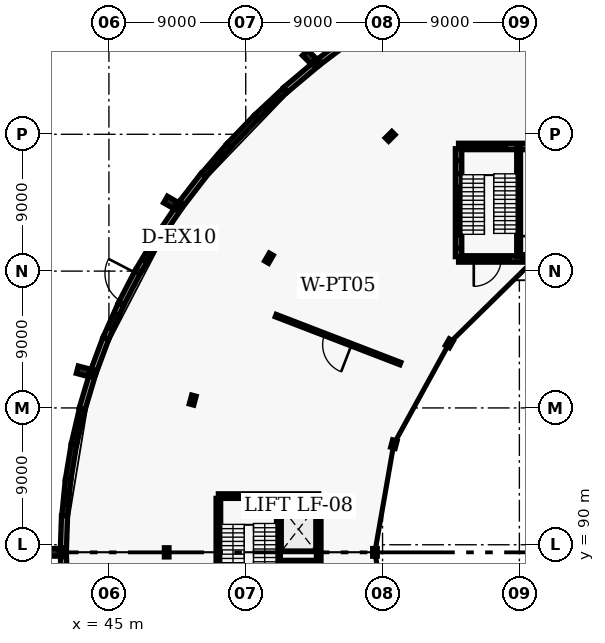
"""IFC4 building model, lengths in metres.
Left out: names, types, materials, properties, quantities, classifications, styles, units other than length and angle.
Written with IfcOpenShell. Run it as: python <this file> out.ifc"""

import sys

from ifc_helpers import new_model, si_unit, direction, frame, frame_2d, origin, origin_2d, place, context, subcontext, project, spatial, rectangle, i_section, extrude, element, fill, save


model = new_model("IFC4")
c1 = context("Model", 3, precision=1e-05, world=origin(), true_north=direction((0.0, 1.0)))
c2 = subcontext(c1, "Body", "Model", "MODEL_VIEW")
j1 = project(units=[si_unit("LENGTHUNIT", "METRE"), si_unit("PLANEANGLEUNIT", "RADIAN")], contexts=[c1])
p1 = place(None, origin())
s1 = spatial("IfcSite", under=j1, at=p1, CompositionType="ELEMENT")
p2 = place(p1, origin())
s2 = spatial("IfcBuilding", under=s1, at=p2, CompositionType="ELEMENT")
p3 = place(p2, origin())
s3 = spatial("IfcBuildingStorey", under=s2, at=p3, CompositionType="ELEMENT", Elevation=0.0)
p4 = place(p3, frame((63.503, 116.865, 0.0), z_axis=(0.0, 0.0, 1.0), x_axis=(-0.707106781187, 0.707106781187, 0.0)))
e1 = element("IfcColumn", 1, at=p4, inside=s3, PredefinedType="COLUMN", context=c2, shape_type="SweptSolid", body=[
    extrude(i_section(OverallWidth=0.3, OverallDepth=0.6, WebThickness=0.015, FlangeThickness=0.03, FilletRadius=0.027, at=origin_2d()), origin(), (0.0, 0.0, 1.0), 5.4),
])
p5 = place(p3, frame((58.695, 121.673, 0.0), z_axis=(0.0, 0.0, 1.0), x_axis=(-0.707106781187, 0.707106781187, 0.0)))
e2 = element("IfcColumn", 2, at=p5, inside=s3, PredefinedType="COLUMN", context=c2, shape_type="SweptSolid", body=[
    extrude(i_section(OverallWidth=0.3, OverallDepth=0.5, WebThickness=0.014, FlangeThickness=0.028, FilletRadius=0.027, at=origin_2d()), origin(), (0.0, 0.0, 1.0), 5.4),
])
p6 = place(p3, frame((58.187, 122.079, 0.0), z_axis=(0.0, 0.0, 1.0), x_axis=(-0.707106781187, 0.707106781187, 0.0)))
e3 = element("IfcColumn", 3, at=p6, inside=s3, PredefinedType="PILASTER", context=c2, shape_type="SweptSolid", body=[
    extrude(rectangle(XDim=0.8, YDim=0.5, at=origin_2d()), origin(), (0.0, 0.0, 1.0), 5.15),
])
p7 = place(p3, frame((67.39, 103.25, 0.0), z_axis=(0.0, 0.0, 1.0), x_axis=(-0.866025403784, 0.5, 0.0)))
e4 = element("IfcColumn", 4, at=p7, inside=s3, PredefinedType="COLUMN", context=c2, shape_type="SweptSolid", body=[
    extrude(i_section(OverallWidth=0.3, OverallDepth=0.5, WebThickness=0.014, FlangeThickness=0.028, FilletRadius=0.027, at=origin_2d()), origin(), (0.0, 0.0, 1.0), 5.4),
])
for number, where, z_axis, x_axis in (
    (5, (55.526, 108.85, 0.0), (0.0, 0.0, 1.0), (-0.866, 0.5, 0.0)),
    (6, (49.637, 112.25, 0.0), (0.0, 0.0, 1.0), (-0.866, 0.5, 0.0)),
):
    element("IfcColumn", number, at=place(p3, frame(where, z_axis=z_axis, x_axis=x_axis)), inside=s3, PredefinedType="COLUMN", context=c2, shape_type="SweptSolid", body=[
        extrude(i_section(OverallWidth=0.3, OverallDepth=0.6, WebThickness=0.015, FlangeThickness=0.03, FilletRadius=0.027, at=origin_2d()), origin(), (0.0, 0.0, 1.0), 5.4),
    ])
p8 = place(p3, frame((49.047, 112.522, 0.0), z_axis=(0.0, 0.0, 1.0), x_axis=(-0.866025403784, 0.5, 0.0)))
e7 = element("IfcColumn", 7, at=p8, inside=s3, PredefinedType="PILASTER", context=c2, shape_type="SweptSolid", body=[
    extrude(rectangle(XDim=0.75, YDim=0.5, at=origin_2d()), origin(), (0.0, 0.0, 1.0), 5.15),
])
p9 = place(p3, frame((63.744, 96.618, 0.0), z_axis=(0.0, 0.0, 1.0), x_axis=(-0.965925826289, 0.258819045103, 0.0)))
e8 = element("IfcColumn", 8, at=p9, inside=s3, PredefinedType="COLUMN", context=c2, shape_type="SweptSolid", body=[
    extrude(i_section(OverallWidth=0.3, OverallDepth=0.5, WebThickness=0.014, FlangeThickness=0.028, FilletRadius=0.027, at=origin_2d()), origin(), (0.0, 0.0, 1.0), 5.4),
])
p10 = place(p3, frame((50.511, 99.516, 0.0), z_axis=(0.0, 0.0, 1.0), x_axis=(-0.965925826289, 0.258819045103, 0.0)))
e9 = element("IfcColumn", 9, at=p10, inside=s3, PredefinedType="COLUMN", context=c2, shape_type="SweptSolid", body=[
    extrude(i_section(OverallWidth=0.3, OverallDepth=0.6, WebThickness=0.015, FlangeThickness=0.03, FilletRadius=0.027, at=origin_2d()), origin(), (0.0, 0.0, 1.0), 5.4),
])
p11 = place(p3, frame((43.942, 101.276, 0.0), z_axis=(0.0, 0.0, 1.0), x_axis=(-0.965925826289, 0.258819045103, 0.0)))
e10 = element("IfcColumn", 10, at=p11, inside=s3, PredefinedType="COLUMN", context=c2, shape_type="SweptSolid", body=[
    extrude(i_section(OverallWidth=0.3, OverallDepth=0.5, WebThickness=0.014, FlangeThickness=0.028, FilletRadius=0.027, at=origin_2d()), origin(), (0.0, 0.0, 1.0), 5.4),
])
p12 = place(p3, frame((43.306, 101.412, 0.0), z_axis=(0.0, 0.0, 1.0), x_axis=(-0.965925826289, 0.258819045103, 0.0)))
e11 = element("IfcColumn", 11, at=p12, inside=s3, PredefinedType="PILASTER", context=c2, shape_type="SweptSolid", body=[
    extrude(rectangle(XDim=0.8, YDim=0.5, at=origin_2d()), origin(), (0.0, 0.0, 1.0), 5.15),
])
p13 = place(p3, frame((62.5, 89.5, 0.0), z_axis=(0.0, 0.0, 1.0), x_axis=(-1.0, 0.0, 0.0)))
e12 = element("IfcColumn", 12, at=p13, inside=s3, PredefinedType="COLUMN", context=c2, shape_type="SweptSolid", body=[
    extrude(i_section(OverallWidth=0.3, OverallDepth=0.5, WebThickness=0.014, FlangeThickness=0.028, FilletRadius=0.027, at=origin_2d()), origin(), (0.0, 0.0, 1.0), 5.4),
])
for number, where, z_axis, x_axis in (
    (13, (48.8, 89.5, 0.0), (0.0, 0.0, 1.0), (-1.0, 0.0, 0.0)),
    (14, (42.0, 89.5, 0.0), (0.0, 0.0, 1.0), (-1.0, 0.0, 0.0)),
):
    element("IfcColumn", number, at=place(p3, frame(where, z_axis=z_axis, x_axis=x_axis)), inside=s3, PredefinedType="COLUMN", context=c2, shape_type="SweptSolid", body=[
        extrude(i_section(OverallWidth=0.3, OverallDepth=0.6, WebThickness=0.015, FlangeThickness=0.03, FilletRadius=0.027, at=origin_2d()), origin(), (0.0, 0.0, 1.0), 5.4),
    ])
p14 = place(p3, frame((41.35, 89.5, 0.0), z_axis=(0.0, 0.0, 1.0), x_axis=(-1.0, 0.0, 0.0)))
e15 = element("IfcColumn", 15, at=p14, inside=s3, PredefinedType="PILASTER", context=c2, shape_type="SweptSolid", body=[
    extrude(rectangle(XDim=0.75, YDim=0.5, at=origin_2d()), origin(), (0.0, 0.0, 1.0), 5.15),
])
p15 = place(p3, frame((60.879, 123.327, 0.0), z_axis=(0.0, 0.0, 1.0), x_axis=(-0.797585068324, -0.603206481054, 0.0)))
e16 = element("IfcWall", 16, at=p15, inside=s3, PredefinedType="SOLIDWALL", context=c2, shape_type="SweptSolid", body=[
    extrude(rectangle(XDim=2.7, YDim=0.4, at=frame_2d((1.35, 0.0))), origin(), (0.0, 0.0, 1.0), 4.6),
])
p16 = place(p3, frame((58.663, 121.648, 0.0), z_axis=(0.0, 0.0, 1.0), x_axis=(-0.76486611794, -0.644189274691, 0.0)))
e17 = element("IfcWall", 17, at=p16, inside=s3, PredefinedType="SOLIDWALL", context=c2, shape_type="SweptSolid", body=[
    extrude(rectangle(XDim=2.668, YDim=0.4, at=frame_2d((1.334, 0.0))), origin(), (0.0, 0.0, 1.0), 4.6),
])
p17 = place(p3, frame((56.622, 119.929, 0.0), z_axis=(0.0, 0.0, 1.0), x_axis=(-0.730238623616, -0.683192178366, 0.0)))
e18 = element("IfcWall", 18, at=p17, inside=s3, PredefinedType="SOLIDWALL", context=c2, shape_type="SweptSolid", body=[
    extrude(rectangle(XDim=2.636, YDim=0.36, at=frame_2d((1.318, 0.0))), origin(), (0.0, 0.0, 1.0), 4.6),
])
p18 = place(p17, frame((0.668, 0.0, 0.95)))
e19 = element("IfcOpeningElement", 19, at=p18, cuts=e18, PredefinedType="OPENING", context=c2, shape_type="SweptSolid", body=[
    extrude(rectangle(XDim=1.3, YDim=1.95, at=frame_2d((0.65, 0.975))), frame((0.0, 0.19, 0.0), z_axis=(0.0, -1.0, 0.0), x_axis=(1.0, 0.0, 0.0)), (0.0, 0.0, 1.0), 0.38),
])
p19 = place(p3, frame((54.697, 118.128, 0.0), z_axis=(0.0, 0.0, 1.0), x_axis=(-0.693149914462, -0.720793448972, 0.0)))
e20 = element("IfcWall", 20, at=p19, inside=s3, PredefinedType="SOLIDWALL", context=c2, shape_type="SweptSolid", body=[
    extrude(rectangle(XDim=2.605, YDim=0.36, at=frame_2d((1.303, 0.0))), origin(), (0.0, 0.0, 1.0), 4.6),
])
p20 = place(p3, frame((52.891, 116.25, 0.0), z_axis=(0.0, 0.0, 1.0), x_axis=(-0.652570020316, -0.757728426671, 0.0)))
e21 = element("IfcWall", 21, at=p20, inside=s3, PredefinedType="SOLIDWALL", context=c2, shape_type="SweptSolid", body=[
    extrude(rectangle(XDim=2.575, YDim=0.36, at=frame_2d((1.287, 0.0))), origin(), (0.0, 0.0, 1.0), 4.6),
])
p21 = place(p20, frame((0.537, 0.0, 0.95)))
e22 = element("IfcOpeningElement", 22, at=p21, cuts=e21, PredefinedType="OPENING", context=c2, shape_type="SweptSolid", body=[
    extrude(rectangle(XDim=1.5, YDim=2.1, at=frame_2d((0.75, 1.05))), frame((0.0, 0.19, 0.0), z_axis=(0.0, -1.0, 0.0), x_axis=(1.0, 0.0, 0.0)), (0.0, 0.0, 1.0), 0.38),
])
p22 = place(p3, frame((51.211, 114.299, 0.0), z_axis=(0.0, 0.0, 1.0), x_axis=(-0.609808109702, -0.792549095856, 0.0)))
e23 = element("IfcWall", 23, at=p22, inside=s3, PredefinedType="SOLIDWALL", context=c2, shape_type="SweptSolid", body=[
    extrude(rectangle(XDim=2.545, YDim=0.4, at=frame_2d((1.272, 0.0))), origin(), (0.0, 0.0, 1.0), 4.6),
])
p23 = place(p3, frame((49.612, 112.217, 0.0), z_axis=(0.0, 0.0, 1.0), x_axis=(-0.561757719856, -0.827301797521, 0.0)))
e24 = element("IfcWall", 24, at=p23, inside=s3, PredefinedType="SOLIDWALL", context=c2, shape_type="SweptSolid", body=[
    extrude(rectangle(XDim=2.515, YDim=0.4, at=frame_2d((1.258, 0.0))), origin(), (0.0, 0.0, 1.0), 4.6),
])
p24 = place(p3, frame((48.199, 110.136, 0.0), z_axis=(0.0, 0.0, 1.0), x_axis=(-0.512344316931, -0.858780123727, 0.0)))
e25 = element("IfcWall", 25, at=p24, inside=s3, PredefinedType="SOLIDWALL", context=c2, shape_type="SweptSolid", body=[
    extrude(rectangle(XDim=2.488, YDim=0.39, at=frame_2d((1.244, 0.0))), origin(), (0.0, 0.0, 1.0), 4.6),
])
p25 = place(p24, frame((0.719, 0.0, 0.95)))
e26 = element("IfcOpeningElement", 26, at=p25, cuts=e25, PredefinedType="OPENING", context=c2, shape_type="SweptSolid", body=[
    extrude(rectangle(XDim=1.05, YDim=1.35, at=frame_2d((0.525, 0.675))), frame((0.0, 0.205, 0.0), z_axis=(0.0, -1.0, 0.0), x_axis=(1.0, 0.0, 0.0)), (0.0, 0.0, 1.0), 0.41),
])
p26 = place(p3, frame((46.924, 107.999, 0.0), z_axis=(0.0, 0.0, 1.0), x_axis=(-0.460800257055, -0.88750387216, 0.0)))
e27 = element("IfcWall", 27, at=p26, inside=s3, PredefinedType="SOLIDWALL", context=c2, shape_type="SweptSolid", body=[
    extrude(rectangle(XDim=2.463, YDim=0.39, at=frame_2d((1.231, 0.0))), origin(), (0.0, 0.0, 1.0), 4.6),
])
p27 = place(p26, frame((0.182, 0.0, 0.0)))
e28 = element("IfcOpeningElement", 28, at=p27, cuts=e27, PredefinedType="OPENING", context=c2, shape_type="SweptSolid", body=[
    extrude(rectangle(XDim=2.1, YDim=2.35, at=frame_2d((1.05, 1.175))), frame((0.0, 0.205, 0.0), z_axis=(0.0, -1.0, 0.0), x_axis=(1.0, 0.0, 0.0)), (0.0, 0.0, 1.0), 0.41),
])
p28 = place(p3, frame((45.789, 105.813, 0.0), z_axis=(0.0, 0.0, 1.0), x_axis=(-0.405609389351, -0.914046510453, 0.0)))
e29 = element("IfcWall", 29, at=p28, inside=s3, PredefinedType="SOLIDWALL", context=c2, shape_type="SweptSolid", body=[
    extrude(rectangle(XDim=2.441, YDim=0.39, at=frame_2d((1.22, 0.0))), origin(), (0.0, 0.0, 1.0), 4.6),
])
p29 = place(p28, frame((0.62, 0.0, 0.95)))
e30 = element("IfcOpeningElement", 30, at=p29, cuts=e29, PredefinedType="OPENING", context=c2, shape_type="SweptSolid", body=[
    extrude(rectangle(XDim=1.2, YDim=1.8, at=frame_2d((0.6, 0.9))), frame((0.0, 0.205, 0.0), z_axis=(0.0, -1.0, 0.0), x_axis=(1.0, 0.0, 0.0)), (0.0, 0.0, 1.0), 0.41),
])
p30 = place(p3, frame((44.799, 103.582, 0.0), z_axis=(0.0, 0.0, 1.0), x_axis=(-0.348624527721, -0.937262470534, 0.0)))
e31 = element("IfcWall", 31, at=p30, inside=s3, PredefinedType="SOLIDWALL", context=c2, shape_type="SweptSolid", body=[
    extrude(rectangle(XDim=2.421, YDim=0.4, at=frame_2d((1.21, 0.0))), origin(), (0.0, 0.0, 1.0), 4.6),
])
p31 = place(p3, frame((43.929, 101.238, 0.0), z_axis=(0.0, 0.0, 1.0), x_axis=(-0.287208023904, -0.95786823259, 0.0)))
e32 = element("IfcWall", 32, at=p31, inside=s3, PredefinedType="SOLIDWALL", context=c2, shape_type="SweptSolid", body=[
    extrude(rectangle(XDim=2.402, YDim=0.4, at=frame_2d((1.201, 0.0))), origin(), (0.0, 0.0, 1.0), 4.6),
])
p32 = place(p3, frame((43.239, 98.937, 0.0), z_axis=(0.0, 0.0, 1.0), x_axis=(-0.225688046165, -0.974199623187, 0.0)))
e33 = element("IfcWall", 33, at=p32, inside=s3, PredefinedType="SOLIDWALL", context=c2, shape_type="SweptSolid", body=[
    extrude(rectangle(XDim=2.388, YDim=0.36, at=frame_2d((1.194, 0.0))), origin(), (0.0, 0.0, 1.0), 4.6),
])
p33 = place(p32, frame((0.444, 0.0, 0.95)))
e34 = element("IfcOpeningElement", 34, at=p33, cuts=e33, PredefinedType="OPENING", context=c2, shape_type="SweptSolid", body=[
    extrude(rectangle(XDim=1.5, YDim=2.1, at=frame_2d((0.75, 1.05))), frame((0.0, 0.19, 0.0), z_axis=(0.0, -1.0, 0.0), x_axis=(1.0, 0.0, 0.0)), (0.0, 0.0, 1.0), 0.38),
])
p34 = place(p3, frame((42.7, 96.61, 0.0), z_axis=(0.0, 0.0, 1.0), x_axis=(-0.162733815116, -0.98667000837, 0.0)))
e35 = element("IfcWall", 35, at=p34, inside=s3, PredefinedType="SOLIDWALL", context=c2, shape_type="SweptSolid", body=[
    extrude(rectangle(XDim=2.378, YDim=0.36, at=frame_2d((1.189, 0.0))), origin(), (0.0, 0.0, 1.0), 4.6),
])
p35 = place(p3, frame((42.313, 94.264, 0.0), z_axis=(0.0, 0.0, 1.0), x_axis=(-0.0982595143, -0.995160825118, 0.0)))
e36 = element("IfcWall", 36, at=p35, inside=s3, PredefinedType="SOLIDWALL", context=c2, shape_type="SweptSolid", body=[
    extrude(rectangle(XDim=2.37, YDim=0.36, at=frame_2d((1.185, 0.0))), origin(), (0.0, 0.0, 1.0), 4.6),
])
p36 = place(p35, frame((0.685, 0.0, 0.95)))
e37 = element("IfcOpeningElement", 37, at=p36, cuts=e36, PredefinedType="OPENING", context=c2, shape_type="SweptSolid", body=[
    extrude(rectangle(XDim=1.0, YDim=1.5, at=frame_2d((0.5, 0.75))), frame((0.0, 0.19, 0.0), z_axis=(0.0, -1.0, 0.0), x_axis=(1.0, 0.0, 0.0)), (0.0, 0.0, 1.0), 0.38),
])
for number, where, z_axis, x_axis in (
    (38, (42.08, 91.905, 0.0), (0.0, 0.0, 1.0), (-0.034, -0.999, 0.0)),
    (39, (42.0, 89.46, 0.0), (0.0, 0.0, 1.0), (0.034, -0.999, 0.0)),
):
    element("IfcWall", number, at=place(p3, frame(where, z_axis=z_axis, x_axis=x_axis)), inside=s3, PredefinedType="SOLIDWALL", context=c2, shape_type="SweptSolid", body=[
        extrude(rectangle(XDim=2.366, YDim=0.4, at=frame_2d((1.183, 0.0))), origin(), (0.0, 0.0, 1.0), 4.6),
    ])
p37 = place(p3, frame((52.2, 93.2, 0.0), z_axis=(0.0, 0.0, 1.0), x_axis=(1.0, 0.0, 0.0)))
e40 = element("IfcWall", 40, at=p37, inside=s3, PredefinedType="SHEAR", context=c2, shape_type="SweptSolid", body=[
    extrude(rectangle(XDim=6.6, YDim=0.3, at=frame_2d((3.3, 0.0))), origin(), (0.0, 0.0, 1.0), 5.4),
])
p38 = place(p3, frame((52.2, 85.95, 0.0), z_axis=(0.0, 0.0, 1.0), x_axis=(0.0, 1.0, 0.0)))
e41 = element("IfcWall", 41, at=p38, inside=s3, PredefinedType="SHEAR", context=c2, shape_type="SweptSolid", body=[
    extrude(rectangle(XDim=7.1, YDim=0.3, at=frame_2d((3.55, 0.0))), origin(), (0.0, 0.0, 1.0), 5.4),
])
p39 = place(p3, frame((58.8, 85.95, 0.0), z_axis=(0.0, 0.0, 1.0), x_axis=(0.0, 1.0, 0.0)))
e42 = element("IfcWall", 42, at=p39, inside=s3, PredefinedType="SHEAR", context=c2, shape_type="SweptSolid", body=[
    extrude(rectangle(XDim=7.1, YDim=0.3, at=frame_2d((3.55, 0.0))), origin(), (0.0, 0.0, 1.0), 5.4),
])
p40 = place(p39, frame((0.75, 0.0, 0.0)))
e43 = element("IfcOpeningElement", 43, at=p40, cuts=e42, PredefinedType="OPENING", context=c2, shape_type="SweptSolid", body=[
    extrude(rectangle(XDim=1.3, YDim=2.15, at=frame_2d((0.65, 1.075))), frame((0.0, 0.16, 0.0), z_axis=(0.0, -1.0, 0.0), x_axis=(1.0, 0.0, 0.0)), (0.0, 0.0, 1.0), 0.32),
])
p41 = place(p3, frame((56.15, 85.95, 0.0), z_axis=(0.0, 0.0, 1.0), x_axis=(0.0, 1.0, 0.0)))
e44 = element("IfcWall", 44, at=p41, inside=s3, PredefinedType="SHEAR", context=c2, shape_type="SweptSolid", body=[
    extrude(rectangle(XDim=7.1, YDim=0.25, at=frame_2d((3.55, 0.0))), origin(), (0.0, 0.0, 1.0), 5.4),
])
p42 = place(p41, frame((0.2, 0.0, 0.0)))
e45 = element("IfcOpeningElement", 45, at=p42, cuts=e44, PredefinedType="OPENING", context=c2, shape_type="SweptSolid", body=[
    extrude(rectangle(XDim=1.15, YDim=2.15, at=frame_2d((0.575, 1.075))), frame((0.0, 0.135, 0.0), z_axis=(0.0, -1.0, 0.0), x_axis=(1.0, 0.0, 0.0)), (0.0, 0.0, 1.0), 0.27),
])
p43 = place(p3, frame((56.27, 88.85, 0.0), z_axis=(0.0, 0.0, 1.0), x_axis=(1.0, 0.0, 0.0)))
e46 = element("IfcWall", 46, at=p43, inside=s3, PredefinedType="SHEAR", context=c2, shape_type="SweptSolid", body=[
    extrude(rectangle(XDim=2.38, YDim=0.25, at=frame_2d((1.19, 0.0))), origin(), (0.0, 0.0, 1.0), 5.4),
])
p44 = place(p43, frame((0.39, 0.0, 0.0)))
e47 = element("IfcOpeningElement", 47, at=p44, cuts=e46, PredefinedType="OPENING", context=c2, shape_type="SweptSolid", body=[
    extrude(rectangle(XDim=1.6, YDim=2.3, at=frame_2d((0.8, 1.15))), frame((0.0, 0.135, 0.0), z_axis=(0.0, -1.0, 0.0), x_axis=(1.0, 0.0, 0.0)), (0.0, 0.0, 1.0), 0.27),
])
p45 = place(p3, frame((68.0, 108.8, 0.0), z_axis=(0.0, 0.0, 1.0), x_axis=(1.0, 0.0, 0.0)))
e48 = element("IfcWall", 48, at=p45, inside=s3, PredefinedType="SHEAR", context=c2, shape_type="SweptSolid", body=[
    extrude(rectangle(XDim=6.6, YDim=0.42, at=frame_2d((3.3, 0.0))), origin(), (0.0, 0.0, 1.0), 5.4),
])
p46 = place(p45, frame((1.0, 0.0, 0.0)))
e49 = element("IfcOpeningElement", 49, at=p46, cuts=e48, PredefinedType="OPENING", context=c2, shape_type="SweptSolid", body=[
    extrude(rectangle(XDim=1.8, YDim=2.15, at=frame_2d((0.9, 1.075))), frame((0.0, 0.22, 0.0), z_axis=(0.0, -1.0, 0.0), x_axis=(1.0, 0.0, 0.0)), (0.0, 0.0, 1.0), 0.44),
])
p47 = place(p3, frame((68.0, 116.2, 0.0), z_axis=(0.0, 0.0, 1.0), x_axis=(1.0, 0.0, 0.0)))
e50 = element("IfcWall", 50, at=p47, inside=s3, PredefinedType="SHEAR", context=c2, shape_type="SweptSolid", body=[
    extrude(rectangle(XDim=6.6, YDim=0.42, at=frame_2d((3.3, 0.0))), origin(), (0.0, 0.0, 1.0), 5.4),
])
p48 = place(p3, frame((68.0, 108.95, 0.0), z_axis=(0.0, 0.0, 1.0), x_axis=(0.0, 1.0, 0.0)))
e51 = element("IfcWall", 51, at=p48, inside=s3, PredefinedType="SHEAR", context=c2, shape_type="SweptSolid", body=[
    extrude(rectangle(XDim=7.1, YDim=0.42, at=frame_2d((3.55, 0.0))), origin(), (0.0, 0.0, 1.0), 5.4),
])
p49 = place(p3, frame((71.95, 108.95, 0.0), z_axis=(0.0, 0.0, 1.0), x_axis=(0.0, 1.0, 0.0)))
e52 = element("IfcWall", 52, at=p49, inside=s3, PredefinedType="SHEAR", context=c2, shape_type="SweptSolid", body=[
    extrude(rectangle(XDim=7.1, YDim=0.25, at=frame_2d((3.55, 0.0))), origin(), (0.0, 0.0, 1.0), 5.4),
])
p50 = place(p49, frame((0.2, 0.0, 0.0)))
e53 = element("IfcOpeningElement", 53, at=p50, cuts=e52, PredefinedType="OPENING", context=c2, shape_type="SweptSolid", body=[
    extrude(rectangle(XDim=1.15, YDim=2.15, at=frame_2d((0.575, 1.075))), frame((0.0, 0.135, 0.0), z_axis=(0.0, -1.0, 0.0), x_axis=(1.0, 0.0, 0.0)), (0.0, 0.0, 1.0), 0.27),
])
p51 = place(p3, frame((64.17, 101.918, 0.0), z_axis=(0.0, 0.0, 1.0), x_axis=(-0.933238808021, 0.359256631399, 0.0)))
e54 = element("IfcWall", 54, at=p51, inside=s3, PredefinedType="PARTITIONING", context=c2, shape_type="SweptSolid", body=[
    extrude(rectangle(XDim=8.782, YDim=0.165, at=frame_2d((4.391, 0.0))), origin(), (0.0, 0.0, 1.0), 4.3),
])
p52 = place(p51, frame((3.441, 0.0, 0.0)))
e55 = element("IfcOpeningElement", 55, at=p52, cuts=e54, PredefinedType="OPENING", context=c2, shape_type="SweptSolid", body=[
    extrude(rectangle(XDim=1.9, YDim=2.35, at=frame_2d((0.95, 1.175))), frame((0.0, 0.093, 0.0), z_axis=(0.0, -1.0, 0.0), x_axis=(1.0, 0.0, 0.0)), (0.0, 0.0, 1.0), 0.185),
])
p53 = place(p18, origin())
e56 = element("IfcWindow", 56, at=p53, inside=s3, PartitioningType="SINGLE_PANEL", PredefinedType="WINDOW", context=c2, shape_type="SweptSolid", body=[
    extrude(rectangle(XDim=1.3, YDim=1.95, at=frame_2d((0.65, 0.975))), frame((0.0, 0.03, 0.0), z_axis=(0.0, -1.0, 0.0), x_axis=(1.0, 0.0, 0.0)), (0.0, 0.0, 1.0), 0.06),
])
fill(e19, e56)
p54 = place(p21, origin())
e57 = element("IfcWindow", 57, at=p54, inside=s3, PartitioningType="SINGLE_PANEL", PredefinedType="WINDOW", context=c2, shape_type="SweptSolid", body=[
    extrude(rectangle(XDim=1.5, YDim=2.1, at=frame_2d((0.75, 1.05))), frame((0.0, 0.03, 0.0), z_axis=(0.0, -1.0, 0.0), x_axis=(1.0, 0.0, 0.0)), (0.0, 0.0, 1.0), 0.06),
])
fill(e22, e57)
p55 = place(p25, origin())
e58 = element("IfcWindow", 58, at=p55, inside=s3, PartitioningType="SINGLE_PANEL", PredefinedType="WINDOW", context=c2, shape_type="SweptSolid", body=[
    extrude(rectangle(XDim=1.05, YDim=1.35, at=frame_2d((0.525, 0.675))), frame((0.0, 0.03, 0.0), z_axis=(0.0, -1.0, 0.0), x_axis=(1.0, 0.0, 0.0)), (0.0, 0.0, 1.0), 0.06),
])
fill(e26, e58)
p56 = place(p27, frame((2.1, 0.0, 0.0), z_axis=(0.0, 0.0, 1.0), x_axis=(-1.0, 0.0, 0.0)))
e59 = element("IfcDoor", 59, at=p56, inside=s3, OperationType="DOUBLE_DOOR_SINGLE_SWING", PredefinedType="DOOR", context=c2, shape_type="SweptSolid", body=[
    extrude(rectangle(XDim=2.1, YDim=2.35, at=frame_2d((1.05, 1.175))), frame((0.0, 0.025, 0.0), z_axis=(0.0, -1.0, 0.0), x_axis=(1.0, 0.0, 0.0)), (0.0, 0.0, 1.0), 0.05),
])
fill(e28, e59)
p57 = place(p29, origin())
e60 = element("IfcWindow", 60, at=p57, inside=s3, PartitioningType="SINGLE_PANEL", PredefinedType="WINDOW", context=c2, shape_type="SweptSolid", body=[
    extrude(rectangle(XDim=1.2, YDim=1.8, at=frame_2d((0.6, 0.9))), frame((0.0, 0.03, 0.0), z_axis=(0.0, -1.0, 0.0), x_axis=(1.0, 0.0, 0.0)), (0.0, 0.0, 1.0), 0.06),
])
fill(e30, e60)
p58 = place(p33, origin())
e61 = element("IfcWindow", 61, at=p58, inside=s3, PartitioningType="SINGLE_PANEL", PredefinedType="WINDOW", context=c2, shape_type="SweptSolid", body=[
    extrude(rectangle(XDim=1.5, YDim=2.1, at=frame_2d((0.75, 1.05))), frame((0.0, 0.03, 0.0), z_axis=(0.0, -1.0, 0.0), x_axis=(1.0, 0.0, 0.0)), (0.0, 0.0, 1.0), 0.06),
])
fill(e34, e61)
p59 = place(p36, origin())
e62 = element("IfcWindow", 62, at=p59, inside=s3, PartitioningType="SINGLE_PANEL", PredefinedType="WINDOW", context=c2, shape_type="SweptSolid", body=[
    extrude(rectangle(XDim=1.0, YDim=1.5, at=frame_2d((0.5, 0.75))), frame((0.0, 0.03, 0.0), z_axis=(0.0, -1.0, 0.0), x_axis=(1.0, 0.0, 0.0)), (0.0, 0.0, 1.0), 0.06),
])
fill(e37, e62)
p60 = place(p44, origin())
e63 = element("IfcDoor", 63, at=p60, inside=s3, OperationType="SLIDING_TO_LEFT", PredefinedType="DOOR", context=c2, shape_type="SweptSolid", body=[
    extrude(rectangle(XDim=1.6, YDim=2.3, at=frame_2d((0.8, 1.15))), frame((0.0, 0.025, 0.0), z_axis=(0.0, -1.0, 0.0), x_axis=(1.0, 0.0, 0.0)), (0.0, 0.0, 1.0), 0.05),
])
fill(e47, e63)
p61 = place(p50, origin())
e64 = element("IfcDoor", 64, at=p61, inside=s3, OperationType="SINGLE_SWING_RIGHT", PredefinedType="DOOR", context=c2, shape_type="SweptSolid", body=[
    extrude(rectangle(XDim=1.15, YDim=2.15, at=frame_2d((0.575, 1.075))), frame((0.0, 0.025, 0.0), z_axis=(0.0, -1.0, 0.0), x_axis=(1.0, 0.0, 0.0)), (0.0, 0.0, 1.0), 0.05),
])
fill(e53, e64)
p62 = place(p46, frame((1.8, 0.0, 0.0), z_axis=(0.0, 0.0, 1.0), x_axis=(-1.0, 0.0, 0.0)))
e65 = element("IfcDoor", 65, at=p62, inside=s3, OperationType="DOUBLE_DOOR_SINGLE_SWING", PredefinedType="DOOR", context=c2, shape_type="SweptSolid", body=[
    extrude(rectangle(XDim=1.8, YDim=2.15, at=frame_2d((0.9, 1.075))), frame((0.0, 0.025, 0.0), z_axis=(0.0, -1.0, 0.0), x_axis=(1.0, 0.0, 0.0)), (0.0, 0.0, 1.0), 0.05),
])
fill(e49, e65)
p63 = place(p52, origin())
e66 = element("IfcDoor", 66, at=p63, inside=s3, OperationType="DOUBLE_DOOR_SINGLE_SWING", PredefinedType="DOOR", context=c2, shape_type="SweptSolid", body=[
    extrude(rectangle(XDim=1.9, YDim=2.35, at=frame_2d((0.95, 1.175))), frame((0.0, 0.025, 0.0), z_axis=(0.0, -1.0, 0.0), x_axis=(1.0, 0.0, 0.0)), (0.0, 0.0, 1.0), 0.05),
])
fill(e55, e66)
save(model, sys.argv[1])
